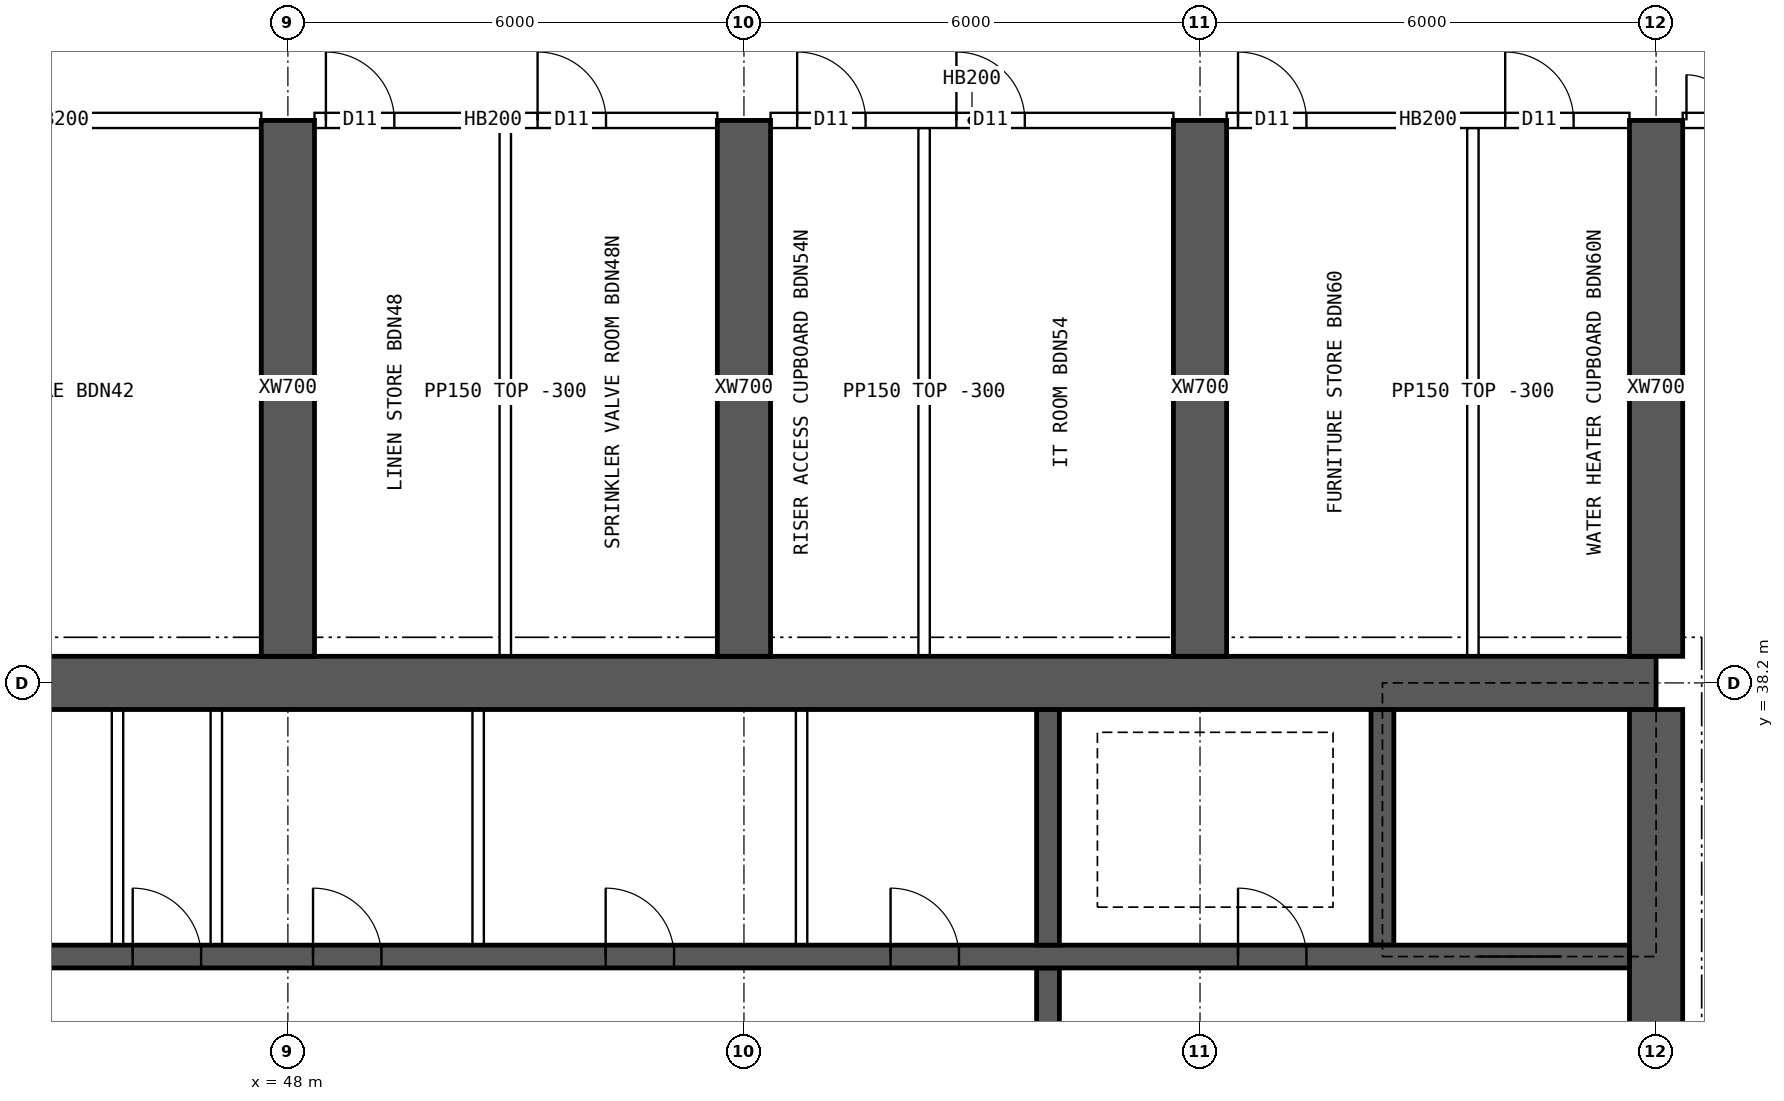
"""IFC4 building model, lengths in metres.
Left out: names, types, materials, properties, quantities, classifications, styles, units other than length and angle.
Written with IfcOpenShell. Run it as: python <this file> out.ifc"""

import sys

from ifc_helpers import new_model, si_unit, direction, frame, frame_2d, origin, place, context, subcontext, project, spatial, rectangle, extrude, element, fill, save


model = new_model("IFC4")
c1 = context("Model", 3, precision=1e-05, world=origin(), true_north=direction((0.0, 1.0)))
c2 = subcontext(c1, "Body", "Model", "MODEL_VIEW")
j1 = project(units=[si_unit("LENGTHUNIT", "METRE"), si_unit("PLANEANGLEUNIT", "RADIAN")], contexts=[c1])
p1 = place(None, origin())
s1 = spatial("IfcSite", under=j1, at=p1, CompositionType="ELEMENT")
p2 = place(p1, origin())
s2 = spatial("IfcBuilding", under=s1, at=p2, CompositionType="ELEMENT")
p3 = place(p2, frame((0.0, 0.0, 257.8)))
s3 = spatial("IfcBuildingStorey", under=s2, at=p3, CompositionType="ELEMENT", Elevation=257.8)
p4 = place(p3, frame((18.0, 38.2, 0.0), z_axis=(0.0, 0.0, 1.0), x_axis=(1.0, 0.0, 0.0)))
e1 = element("IfcWall", 1, at=p4, inside=s3, PredefinedType="SHEAR", context=c2, shape_type="SweptSolid", body=[
    extrude(rectangle(XDim=48.0, YDim=0.7, at=frame_2d((24.0, 0.0))), origin(), (0.0, 0.0, 1.0), 4.5),
])
p5 = place(p3, frame((66.0, 26.15, 0.0), z_axis=(0.0, 0.0, 1.0), x_axis=(0.0, 1.0, 0.0)))
e2 = element("IfcWall", 2, at=p5, inside=s3, PredefinedType="SHEAR", context=c2, shape_type="SweptSolid", body=[
    extrude(rectangle(XDim=11.7, YDim=0.7, at=frame_2d((5.85, 0.0))), origin(), (0.0, 0.0, 1.0), 4.5),
])
p6 = place(p5, frame((5.15, 0.0, 0.0)))
e3 = element("IfcOpeningElement", 3, at=p6, cuts=e2, PredefinedType="OPENING", context=c2, shape_type="SweptSolid", body=[
    extrude(rectangle(XDim=1.2, YDim=2.1, at=frame_2d((0.6, 1.05))), frame((0.0, 0.36, 0.0), z_axis=(0.0, -1.0, 0.0), x_axis=(1.0, 0.0, 0.0)), (0.0, 0.0, 1.0), 0.72),
])
p7 = place(p3, frame((18.35, 34.6, 0.0), z_axis=(0.0, 0.0, 1.0), x_axis=(1.0, 0.0, 0.0)))
e4 = element("IfcWall", 4, at=p7, inside=s3, PredefinedType="SHEAR", context=c2, shape_type="SweptSolid", body=[
    extrude(rectangle(XDim=47.3, YDim=0.3, at=frame_2d((23.65, 0.0))), origin(), (0.0, 0.0, 1.0), 4.5),
])
p8 = place(p7, frame((0.9, 0.0, 0.0)))
e5 = element("IfcOpeningElement", 5, at=p8, cuts=e4, PredefinedType="OPENING", context=c2, shape_type="SweptSolid", body=[
    extrude(rectangle(XDim=1.1, YDim=2.1, at=frame_2d((0.55, 1.05))), frame((0.0, 0.16, 0.0), z_axis=(0.0, -1.0, 0.0), x_axis=(1.0, 0.0, 0.0)), (0.0, 0.0, 1.0), 0.32),
])
p9 = place(p7, frame((45.3, 0.0, 0.0)))
e6 = element("IfcOpeningElement", 6, at=p9, cuts=e4, PredefinedType="OPENING", context=c2, shape_type="SweptSolid", body=[
    extrude(rectangle(XDim=1.1, YDim=2.1, at=frame_2d((0.55, 1.05))), frame((0.0, 0.16, 0.0), z_axis=(0.0, -1.0, 0.0), x_axis=(1.0, 0.0, 0.0)), (0.0, 0.0, 1.0), 0.32),
])
p10 = place(p7, frame((4.25, 0.0, 0.0)))
e7 = element("IfcOpeningElement", 7, at=p10, cuts=e4, PredefinedType="OPENING", context=c2, shape_type="SweptSolid", body=[
    extrude(rectangle(XDim=0.9, YDim=2.1, at=frame_2d((0.45, 1.05))), frame((0.0, 0.16, 0.0), z_axis=(0.0, -1.0, 0.0), x_axis=(1.0, 0.0, 0.0)), (0.0, 0.0, 1.0), 0.32),
])
p11 = place(p7, frame((42.15, 0.0, 0.0)))
e8 = element("IfcOpeningElement", 8, at=p11, cuts=e4, PredefinedType="OPENING", context=c2, shape_type="SweptSolid", body=[
    extrude(rectangle(XDim=0.9, YDim=2.1, at=frame_2d((0.45, 1.05))), frame((0.0, 0.16, 0.0), z_axis=(0.0, -1.0, 0.0), x_axis=(1.0, 0.0, 0.0)), (0.0, 0.0, 1.0), 0.32),
])
p12 = place(p7, frame((9.025, 0.0, 0.0)))
e9 = element("IfcOpeningElement", 9, at=p12, cuts=e4, PredefinedType="OPENING", context=c2, shape_type="SweptSolid", body=[
    extrude(rectangle(XDim=0.9, YDim=2.1, at=frame_2d((0.45, 1.05))), frame((0.0, 0.16, 0.0), z_axis=(0.0, -1.0, 0.0), x_axis=(1.0, 0.0, 0.0)), (0.0, 0.0, 1.0), 0.32),
])
p13 = place(p7, frame((12.999, 0.0, 0.0)))
e10 = element("IfcOpeningElement", 10, at=p13, cuts=e4, PredefinedType="OPENING", context=c2, shape_type="SweptSolid", body=[
    extrude(rectangle(XDim=0.9, YDim=2.1, at=frame_2d((0.45, 1.05))), frame((0.0, 0.16, 0.0), z_axis=(0.0, -1.0, 0.0), x_axis=(1.0, 0.0, 0.0)), (0.0, 0.0, 1.0), 0.32),
])
p14 = place(p7, frame((16.646, 0.0, 0.0)))
e11 = element("IfcOpeningElement", 11, at=p14, cuts=e4, PredefinedType="OPENING", context=c2, shape_type="SweptSolid", body=[
    extrude(rectangle(XDim=0.9, YDim=2.1, at=frame_2d((0.45, 1.05))), frame((0.0, 0.16, 0.0), z_axis=(0.0, -1.0, 0.0), x_axis=(1.0, 0.0, 0.0)), (0.0, 0.0, 1.0), 0.32),
])
p15 = place(p7, frame((20.405, 0.0, 0.0)))
e12 = element("IfcOpeningElement", 12, at=p15, cuts=e4, PredefinedType="OPENING", context=c2, shape_type="SweptSolid", body=[
    extrude(rectangle(XDim=0.9, YDim=2.1, at=frame_2d((0.45, 1.05))), frame((0.0, 0.16, 0.0), z_axis=(0.0, -1.0, 0.0), x_axis=(1.0, 0.0, 0.0)), (0.0, 0.0, 1.0), 0.32),
])
p16 = place(p7, frame((24.811, 0.0, 0.0)))
e13 = element("IfcOpeningElement", 13, at=p16, cuts=e4, PredefinedType="OPENING", context=c2, shape_type="SweptSolid", body=[
    extrude(rectangle(XDim=0.9, YDim=2.1, at=frame_2d((0.45, 1.05))), frame((0.0, 0.16, 0.0), z_axis=(0.0, -1.0, 0.0), x_axis=(1.0, 0.0, 0.0)), (0.0, 0.0, 1.0), 0.32),
])
p17 = place(p7, frame((27.608, 0.0, 0.0)))
e14 = element("IfcOpeningElement", 14, at=p17, cuts=e4, PredefinedType="OPENING", context=c2, shape_type="SweptSolid", body=[
    extrude(rectangle(XDim=0.9, YDim=2.1, at=frame_2d((0.45, 1.05))), frame((0.0, 0.16, 0.0), z_axis=(0.0, -1.0, 0.0), x_axis=(1.0, 0.0, 0.0)), (0.0, 0.0, 1.0), 0.32),
])
p18 = place(p7, frame((29.981, 0.0, 0.0)))
e15 = element("IfcOpeningElement", 15, at=p18, cuts=e4, PredefinedType="OPENING", context=c2, shape_type="SweptSolid", body=[
    extrude(rectangle(XDim=0.9, YDim=2.1, at=frame_2d((0.45, 1.05))), frame((0.0, 0.16, 0.0), z_axis=(0.0, -1.0, 0.0), x_axis=(1.0, 0.0, 0.0)), (0.0, 0.0, 1.0), 0.32),
])
p19 = place(p7, frame((33.831, 0.0, 0.0)))
e16 = element("IfcOpeningElement", 16, at=p19, cuts=e4, PredefinedType="OPENING", context=c2, shape_type="SweptSolid", body=[
    extrude(rectangle(XDim=0.9, YDim=2.1, at=frame_2d((0.45, 1.05))), frame((0.0, 0.16, 0.0), z_axis=(0.0, -1.0, 0.0), x_axis=(1.0, 0.0, 0.0)), (0.0, 0.0, 1.0), 0.32),
])
p20 = place(p7, frame((37.579, 0.0, 0.0)))
e17 = element("IfcOpeningElement", 17, at=p20, cuts=e4, PredefinedType="OPENING", context=c2, shape_type="SweptSolid", body=[
    extrude(rectangle(XDim=0.9, YDim=2.1, at=frame_2d((0.45, 1.05))), frame((0.0, 0.16, 0.0), z_axis=(0.0, -1.0, 0.0), x_axis=(1.0, 0.0, 0.0)), (0.0, 0.0, 1.0), 0.32),
])
p21 = place(p3, frame((58.0, 30.55, 0.0), z_axis=(0.0, 0.0, 1.0), x_axis=(0.0, 1.0, 0.0)))
e18 = element("IfcWall", 18, at=p21, inside=s3, PredefinedType="SHEAR", context=c2, shape_type="SweptSolid", body=[
    extrude(rectangle(XDim=3.9, YDim=0.3, at=frame_2d((1.95, 0.0))), origin(), (0.0, 0.0, 1.0), 4.5),
])
p22 = place(p21, frame((1.4, 0.0, 0.0)))
e19 = element("IfcOpeningElement", 19, at=p22, cuts=e18, PredefinedType="OPENING", context=c2, shape_type="SweptSolid", body=[
    extrude(rectangle(XDim=1.2, YDim=2.1, at=frame_2d((0.6, 1.05))), frame((0.0, 0.16, 0.0), z_axis=(0.0, -1.0, 0.0), x_axis=(1.0, 0.0, 0.0)), (0.0, 0.0, 1.0), 0.32),
])
for number, where, z_axis, x_axis in (
    (20, (62.4, 34.75, 0.0), (0.0, 0.0, 1.0), (0.0, 1.0, 0.0)),
    (21, (58.0, 34.75, 0.0), (0.0, 0.0, 1.0), (0.0, 1.0, 0.0)),
):
    element("IfcWall", number, at=place(p3, frame(where, z_axis=z_axis, x_axis=x_axis)), inside=s3, PredefinedType="SHEAR", context=c2, shape_type="SweptSolid", body=[
        extrude(rectangle(XDim=3.1, YDim=0.3, at=frame_2d((1.55, 0.0))), origin(), (0.0, 0.0, 1.0), 4.5),
    ])
for number, where, z_axis, x_axis in (
    (22, (48.0, 38.55, 0.0), (0.0, 0.0, 1.0), (0.0, 1.0, 0.0)),
    (23, (54.0, 38.55, 0.0), (0.0, 0.0, 1.0), (0.0, 1.0, 0.0)),
    (24, (60.0, 38.55, 0.0), (0.0, 0.0, 1.0), (0.0, 1.0, 0.0)),
    (25, (66.0, 38.55, 0.0), (0.0, 0.0, 1.0), (0.0, 1.0, 0.0)),
):
    element("IfcWall", number, at=place(p3, frame(where, z_axis=z_axis, x_axis=x_axis)), inside=s3, PredefinedType="SHEAR", context=c2, shape_type="SweptSolid", body=[
        extrude(rectangle(XDim=7.05, YDim=0.7, at=frame_2d((3.525, 0.0))), origin(), (0.0, 0.0, 1.0), 4.5),
    ])
for number, where, z_axis, x_axis in (
    (26, (45.758, 34.75, 0.0), (0.0, 0.0, 1.0), (0.0, 1.0, 0.0)),
    (27, (47.058, 34.75, 0.0), (0.0, 0.0, 1.0), (0.0, 1.0, 0.0)),
    (28, (50.503, 34.75, 0.0), (0.0, 0.0, 1.0), (0.0, 1.0, 0.0)),
    (29, (54.758, 34.75, 0.0), (0.0, 0.0, 1.0), (0.0, 1.0, 0.0)),
):
    element("IfcWall", number, at=place(p3, frame(where, z_axis=z_axis, x_axis=x_axis)), inside=s3, PredefinedType="SOLIDWALL", context=c2, shape_type="SweptSolid", body=[
        extrude(rectangle(XDim=3.1, YDim=0.15, at=frame_2d((1.55, 0.0))), origin(), (0.0, 0.0, 1.0), 4.2),
    ])
p23 = place(p3, frame((42.35, 45.6, 0.0), z_axis=(0.0, 0.0, 1.0), x_axis=(1.0, 0.0, 0.0)))
e30 = element("IfcWall", 30, at=p23, inside=s3, PredefinedType="SOLIDWALL", context=c2, shape_type="SweptSolid", body=[
    extrude(rectangle(XDim=5.3, YDim=0.2, at=frame_2d((2.65, 0.0))), origin(), (0.0, 0.0, 1.0), 4.2),
])
p24 = place(p23, frame((0.8, 0.0, 0.0)))
e31 = element("IfcOpeningElement", 31, at=p24, cuts=e30, PredefinedType="OPENING", context=c2, shape_type="SweptSolid", body=[
    extrude(rectangle(XDim=1.0, YDim=2.1, at=frame_2d((0.5, 1.05))), frame((0.0, 0.11, 0.0), z_axis=(0.0, -1.0, 0.0), x_axis=(1.0, 0.0, 0.0)), (0.0, 0.0, 1.0), 0.22),
])
p25 = place(p3, frame((48.35, 45.6, 0.0), z_axis=(0.0, 0.0, 1.0), x_axis=(1.0, 0.0, 0.0)))
e32 = element("IfcWall", 32, at=p25, inside=s3, PredefinedType="SOLIDWALL", context=c2, shape_type="SweptSolid", body=[
    extrude(rectangle(XDim=5.3, YDim=0.2, at=frame_2d((2.65, 0.0))), origin(), (0.0, 0.0, 1.0), 4.2),
])
p26 = place(p25, frame((0.15, 0.0, 0.0)))
e33 = element("IfcOpeningElement", 33, at=p26, cuts=e32, PredefinedType="OPENING", context=c2, shape_type="SweptSolid", body=[
    extrude(rectangle(XDim=0.9, YDim=2.1, at=frame_2d((0.45, 1.05))), frame((0.0, 0.11, 0.0), z_axis=(0.0, -1.0, 0.0), x_axis=(1.0, 0.0, 0.0)), (0.0, 0.0, 1.0), 0.22),
])
p27 = place(p25, frame((2.935, 0.0, 0.0)))
e34 = element("IfcOpeningElement", 34, at=p27, cuts=e32, PredefinedType="OPENING", context=c2, shape_type="SweptSolid", body=[
    extrude(rectangle(XDim=0.9, YDim=2.1, at=frame_2d((0.45, 1.05))), frame((0.0, 0.11, 0.0), z_axis=(0.0, -1.0, 0.0), x_axis=(1.0, 0.0, 0.0)), (0.0, 0.0, 1.0), 0.22),
])
p28 = place(p3, frame((54.35, 45.6, 0.0), z_axis=(0.0, 0.0, 1.0), x_axis=(1.0, 0.0, 0.0)))
e35 = element("IfcWall", 35, at=p28, inside=s3, PredefinedType="SOLIDWALL", context=c2, shape_type="SweptSolid", body=[
    extrude(rectangle(XDim=5.3, YDim=0.2, at=frame_2d((2.65, 0.0))), origin(), (0.0, 0.0, 1.0), 4.2),
])
p29 = place(p28, frame((0.35, 0.0, 0.0)))
e36 = element("IfcOpeningElement", 36, at=p29, cuts=e35, PredefinedType="OPENING", context=c2, shape_type="SweptSolid", body=[
    extrude(rectangle(XDim=0.9, YDim=2.1, at=frame_2d((0.45, 1.05))), frame((0.0, 0.11, 0.0), z_axis=(0.0, -1.0, 0.0), x_axis=(1.0, 0.0, 0.0)), (0.0, 0.0, 1.0), 0.22),
])
p30 = place(p28, frame((2.445, 0.0, 0.0)))
e37 = element("IfcOpeningElement", 37, at=p30, cuts=e35, PredefinedType="OPENING", context=c2, shape_type="SweptSolid", body=[
    extrude(rectangle(XDim=0.9, YDim=2.1, at=frame_2d((0.45, 1.05))), frame((0.0, 0.11, 0.0), z_axis=(0.0, -1.0, 0.0), x_axis=(1.0, 0.0, 0.0)), (0.0, 0.0, 1.0), 0.22),
])
p31 = place(p3, frame((60.35, 45.6, 0.0), z_axis=(0.0, 0.0, 1.0), x_axis=(1.0, 0.0, 0.0)))
e38 = element("IfcWall", 38, at=p31, inside=s3, PredefinedType="SOLIDWALL", context=c2, shape_type="SweptSolid", body=[
    extrude(rectangle(XDim=5.3, YDim=0.2, at=frame_2d((2.65, 0.0))), origin(), (0.0, 0.0, 1.0), 4.2),
])
p32 = place(p31, frame((0.15, 0.0, 0.0)))
e39 = element("IfcOpeningElement", 39, at=p32, cuts=e38, PredefinedType="OPENING", context=c2, shape_type="SweptSolid", body=[
    extrude(rectangle(XDim=0.9, YDim=2.1, at=frame_2d((0.45, 1.05))), frame((0.0, 0.11, 0.0), z_axis=(0.0, -1.0, 0.0), x_axis=(1.0, 0.0, 0.0)), (0.0, 0.0, 1.0), 0.22),
])
p33 = place(p31, frame((3.665, 0.0, 0.0)))
e40 = element("IfcOpeningElement", 40, at=p33, cuts=e38, PredefinedType="OPENING", context=c2, shape_type="SweptSolid", body=[
    extrude(rectangle(XDim=0.9, YDim=2.1, at=frame_2d((0.45, 1.05))), frame((0.0, 0.11, 0.0), z_axis=(0.0, -1.0, 0.0), x_axis=(1.0, 0.0, 0.0)), (0.0, 0.0, 1.0), 0.22),
])
p34 = place(p3, frame((66.35, 45.6, 0.0), z_axis=(0.0, 0.0, 1.0), x_axis=(1.0, 0.0, 0.0)))
e41 = element("IfcWall", 41, at=p34, inside=s3, PredefinedType="SOLIDWALL", context=c2, shape_type="SweptSolid", body=[
    extrude(rectangle(XDim=2.05, YDim=0.2, at=frame_2d((1.025, 0.0))), origin(), (0.0, 0.0, 1.0), 4.2),
])
p35 = place(p34, frame((0.05, 0.0, 0.0)))
e42 = element("IfcOpeningElement", 42, at=p35, cuts=e41, PredefinedType="OPENING", context=c2, shape_type="SweptSolid", body=[
    extrude(rectangle(XDim=1.2, YDim=2.1, at=frame_2d((0.6, 1.05))), frame((0.0, 0.11, 0.0), z_axis=(0.0, -1.0, 0.0), x_axis=(1.0, 0.0, 0.0)), (0.0, 0.0, 1.0), 0.22),
])
for number, where, z_axis, x_axis in (
    (43, (50.86, 38.55, 0.0), (0.0, 0.0, 1.0), (0.0, 1.0, 0.0)),
    (44, (56.37, 38.55, 0.0), (0.0, 0.0, 1.0), (0.0, 1.0, 0.0)),
    (45, (63.59, 38.55, 0.0), (0.0, 0.0, 1.0), (0.0, 1.0, 0.0)),
):
    element("IfcWall", number, at=place(p3, frame(where, z_axis=z_axis, x_axis=x_axis)), inside=s3, PredefinedType="PARTITIONING", context=c2, shape_type="SweptSolid", body=[
        extrude(rectangle(XDim=6.95, YDim=0.15, at=frame_2d((3.475, 0.0))), origin(), (0.0, 0.0, 1.0), 4.2),
    ])
p36 = place(p9, origin())
e46 = element("IfcDoor", 46, at=p36, inside=s3, OperationType="DOUBLE_DOOR_SLIDING", PredefinedType="DOOR", context=c2, shape_type="SweptSolid", body=[
    extrude(rectangle(XDim=1.1, YDim=2.1, at=frame_2d((0.55, 1.05))), frame((0.0, 0.025, 0.0), z_axis=(0.0, -1.0, 0.0), x_axis=(1.0, 0.0, 0.0)), (0.0, 0.0, 1.0), 0.05),
])
fill(e6, e46)
p37 = place(p11, origin())
e47 = element("IfcDoor", 47, at=p37, inside=s3, OperationType="SINGLE_SWING_LEFT", PredefinedType="DOOR", context=c2, shape_type="SweptSolid", body=[
    extrude(rectangle(XDim=0.9, YDim=2.1, at=frame_2d((0.45, 1.05))), frame((0.0, 0.025, 0.0), z_axis=(0.0, -1.0, 0.0), x_axis=(1.0, 0.0, 0.0)), (0.0, 0.0, 1.0), 0.05),
])
fill(e8, e47)
p38 = place(p17, origin())
e48 = element("IfcDoor", 48, at=p38, inside=s3, OperationType="SINGLE_SWING_LEFT", PredefinedType="DOOR", context=c2, shape_type="SweptSolid", body=[
    extrude(rectangle(XDim=0.9, YDim=2.1, at=frame_2d((0.45, 1.05))), frame((0.0, 0.025, 0.0), z_axis=(0.0, -1.0, 0.0), x_axis=(1.0, 0.0, 0.0)), (0.0, 0.0, 1.0), 0.05),
])
fill(e14, e48)
p39 = place(p18, origin())
e49 = element("IfcDoor", 49, at=p39, inside=s3, OperationType="SINGLE_SWING_LEFT", PredefinedType="DOOR", context=c2, shape_type="SweptSolid", body=[
    extrude(rectangle(XDim=0.9, YDim=2.1, at=frame_2d((0.45, 1.05))), frame((0.0, 0.025, 0.0), z_axis=(0.0, -1.0, 0.0), x_axis=(1.0, 0.0, 0.0)), (0.0, 0.0, 1.0), 0.05),
])
fill(e15, e49)
p40 = place(p19, origin())
e50 = element("IfcDoor", 50, at=p40, inside=s3, OperationType="SINGLE_SWING_LEFT", PredefinedType="DOOR", context=c2, shape_type="SweptSolid", body=[
    extrude(rectangle(XDim=0.9, YDim=2.1, at=frame_2d((0.45, 1.05))), frame((0.0, 0.025, 0.0), z_axis=(0.0, -1.0, 0.0), x_axis=(1.0, 0.0, 0.0)), (0.0, 0.0, 1.0), 0.05),
])
fill(e16, e50)
p41 = place(p20, origin())
e51 = element("IfcDoor", 51, at=p41, inside=s3, OperationType="SINGLE_SWING_LEFT", PredefinedType="DOOR", context=c2, shape_type="SweptSolid", body=[
    extrude(rectangle(XDim=0.9, YDim=2.1, at=frame_2d((0.45, 1.05))), frame((0.0, 0.025, 0.0), z_axis=(0.0, -1.0, 0.0), x_axis=(1.0, 0.0, 0.0)), (0.0, 0.0, 1.0), 0.05),
])
fill(e17, e51)
p42 = place(p35, origin())
e52 = element("IfcDoor", 52, at=p42, inside=s3, OperationType="DOUBLE_DOOR_SINGLE_SWING", PredefinedType="DOOR", context=c2, shape_type="SweptSolid", body=[
    extrude(rectangle(XDim=1.2, YDim=2.1, at=frame_2d((0.6, 1.05))), frame((0.0, 0.025, 0.0), z_axis=(0.0, -1.0, 0.0), x_axis=(1.0, 0.0, 0.0)), (0.0, 0.0, 1.0), 0.05),
])
fill(e42, e52)
p43 = place(p26, origin())
e53 = element("IfcDoor", 53, at=p43, inside=s3, OperationType="SINGLE_SWING_LEFT", PredefinedType="DOOR", context=c2, shape_type="SweptSolid", body=[
    extrude(rectangle(XDim=0.9, YDim=2.1, at=frame_2d((0.45, 1.05))), frame((0.0, 0.025, 0.0), z_axis=(0.0, -1.0, 0.0), x_axis=(1.0, 0.0, 0.0)), (0.0, 0.0, 1.0), 0.05),
])
fill(e33, e53)
p44 = place(p27, origin())
e54 = element("IfcDoor", 54, at=p44, inside=s3, OperationType="SINGLE_SWING_LEFT", PredefinedType="DOOR", context=c2, shape_type="SweptSolid", body=[
    extrude(rectangle(XDim=0.9, YDim=2.1, at=frame_2d((0.45, 1.05))), frame((0.0, 0.025, 0.0), z_axis=(0.0, -1.0, 0.0), x_axis=(1.0, 0.0, 0.0)), (0.0, 0.0, 1.0), 0.05),
])
fill(e34, e54)
p45 = place(p29, origin())
e55 = element("IfcDoor", 55, at=p45, inside=s3, OperationType="SINGLE_SWING_LEFT", PredefinedType="DOOR", context=c2, shape_type="SweptSolid", body=[
    extrude(rectangle(XDim=0.9, YDim=2.1, at=frame_2d((0.45, 1.05))), frame((0.0, 0.025, 0.0), z_axis=(0.0, -1.0, 0.0), x_axis=(1.0, 0.0, 0.0)), (0.0, 0.0, 1.0), 0.05),
])
fill(e36, e55)
p46 = place(p30, origin())
e56 = element("IfcDoor", 56, at=p46, inside=s3, OperationType="SINGLE_SWING_LEFT", PredefinedType="DOOR", context=c2, shape_type="SweptSolid", body=[
    extrude(rectangle(XDim=0.9, YDim=2.1, at=frame_2d((0.45, 1.05))), frame((0.0, 0.025, 0.0), z_axis=(0.0, -1.0, 0.0), x_axis=(1.0, 0.0, 0.0)), (0.0, 0.0, 1.0), 0.05),
])
fill(e37, e56)
p47 = place(p32, origin())
e57 = element("IfcDoor", 57, at=p47, inside=s3, OperationType="SINGLE_SWING_LEFT", PredefinedType="DOOR", context=c2, shape_type="SweptSolid", body=[
    extrude(rectangle(XDim=0.9, YDim=2.1, at=frame_2d((0.45, 1.05))), frame((0.0, 0.025, 0.0), z_axis=(0.0, -1.0, 0.0), x_axis=(1.0, 0.0, 0.0)), (0.0, 0.0, 1.0), 0.05),
])
fill(e39, e57)
p48 = place(p33, origin())
e58 = element("IfcDoor", 58, at=p48, inside=s3, OperationType="SINGLE_SWING_LEFT", PredefinedType="DOOR", context=c2, shape_type="SweptSolid", body=[
    extrude(rectangle(XDim=0.9, YDim=2.1, at=frame_2d((0.45, 1.05))), frame((0.0, 0.025, 0.0), z_axis=(0.0, -1.0, 0.0), x_axis=(1.0, 0.0, 0.0)), (0.0, 0.0, 1.0), 0.05),
])
fill(e40, e58)
save(model, sys.argv[1])
